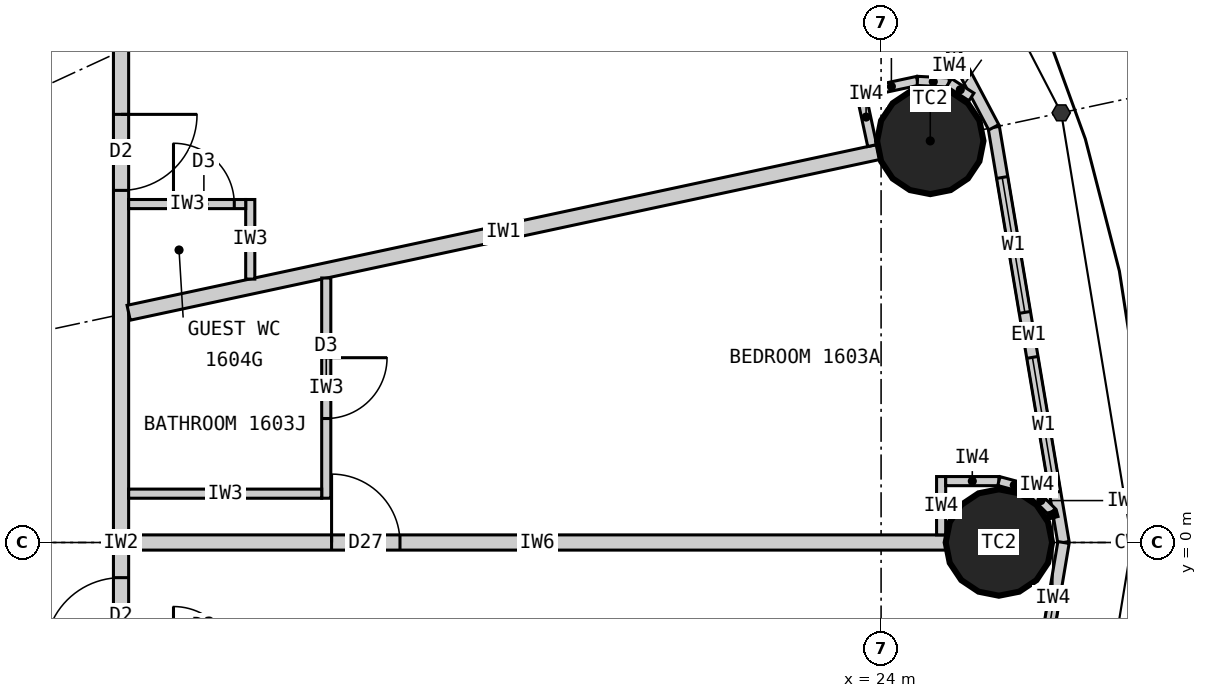
"""IFC4 building model, lengths in metres.
Left out: names, types, materials, properties, quantities, classifications, styles, units other than length and angle.
Written with IfcOpenShell. Run it as: python <this file> out.ifc"""

import sys

from ifc_helpers import new_model, si_unit, direction, frame, frame_2d, origin, origin_2d, place, context, subcontext, project, spatial, rectangle, circle, extrude, element, fill, save


model = new_model("IFC4")
c1 = context("Model", 3, precision=1e-05, world=origin(), true_north=direction((0.0, 1.0)))
c2 = subcontext(c1, "Body", "Model", "MODEL_VIEW")
j1 = project(units=[si_unit("LENGTHUNIT", "METRE"), si_unit("PLANEANGLEUNIT", "RADIAN")], contexts=[c1])
p1 = place(None, origin())
s1 = spatial("IfcSite", under=j1, at=p1, CompositionType="ELEMENT")
p2 = place(p1, origin())
s2 = spatial("IfcBuilding", under=s1, at=p2, CompositionType="ELEMENT")
p3 = place(p2, frame((0.0, 0.0, 67.2)))
s3 = spatial("IfcBuildingStorey", under=s2, at=p3, CompositionType="ELEMENT", Elevation=67.2)
for number, where, z_axis, x_axis in (
    (1, (25.55, 0.0, 0.0), (0.0, 0.0, 1.0), (1.0, 0.0, 0.0)),
    (2, (24.647, 5.283, 0.0), (0.0, 0.0, 1.0), (1.0, 0.0, 0.0)),
):
    element("IfcColumn", number, at=place(p3, frame(where, z_axis=z_axis, x_axis=x_axis)), inside=s3, PredefinedType="COLUMN", context=c2, shape_type="SweptSolid", body=[
        extrude(circle(Radius=0.7, at=origin_2d()), origin(), (0.0, 0.0, 1.0), 3.3),
    ])
p4 = place(p3, frame((26.4, 0.0, 0.0), z_axis=(0.0, 0.0, 1.0), x_axis=(-0.165642551694, 0.986185857264, 0.0)))
e3 = element("IfcWall", 3, at=p4, inside=s3, PredefinedType="ELEMENTEDWALL", context=c2, shape_type="SweptSolid", body=[
    extrude(rectangle(XDim=5.539, YDim=0.15, at=frame_2d((2.77, 0.0))), origin(), (0.0, 0.0, 1.0), 3.12),
])
p5 = place(p4, frame((0.669, 0.0, 0.9)))
e4 = element("IfcOpeningElement", 4, at=p5, cuts=e3, PredefinedType="OPENING", context=c2, shape_type="SweptSolid", body=[
    extrude(rectangle(XDim=1.8, YDim=1.9, at=frame_2d((0.9, 0.95))), frame((0.0, 0.085, 0.0), z_axis=(0.0, -1.0, 0.0), x_axis=(1.0, 0.0, 0.0)), (0.0, 0.0, 1.0), 0.17),
])
p6 = place(p4, frame((3.07, 0.0, 0.9)))
e5 = element("IfcOpeningElement", 5, at=p6, cuts=e3, PredefinedType="OPENING", context=c2, shape_type="SweptSolid", body=[
    extrude(rectangle(XDim=1.8, YDim=1.9, at=frame_2d((0.9, 0.95))), frame((0.0, 0.085, 0.0), z_axis=(0.0, -1.0, 0.0), x_axis=(1.0, 0.0, 0.0)), (0.0, 0.0, 1.0), 0.17),
])
p7 = place(p3, frame((25.482, 5.462, 0.0), z_axis=(0.0, 0.0, 1.0), x_axis=(-0.467296867008, 0.884100468321, 0.0)))
e6 = element("IfcWall", 6, at=p7, inside=s3, PredefinedType="ELEMENTEDWALL", context=c2, shape_type="SweptSolid", body=[
    extrude(rectangle(XDim=5.734, YDim=0.15, at=frame_2d((2.867, 0.0))), origin(), (0.0, 0.0, 1.0), 3.12),
])
p8 = place(p7, frame((0.767, 0.0, 0.9)))
e7 = element("IfcOpeningElement", 7, at=p8, cuts=e6, PredefinedType="OPENING", context=c2, shape_type="SweptSolid", body=[
    extrude(rectangle(XDim=1.8, YDim=1.9, at=frame_2d((0.9, 0.95))), frame((0.0, 0.085, 0.0), z_axis=(0.0, -1.0, 0.0), x_axis=(1.0, 0.0, 0.0)), (0.0, 0.0, 1.0), 0.17),
])
p9 = place(p7, frame((3.167, 0.0, 0.9)))
e8 = element("IfcOpeningElement", 8, at=p9, cuts=e6, PredefinedType="OPENING", context=c2, shape_type="SweptSolid", body=[
    extrude(rectangle(XDim=1.8, YDim=1.9, at=frame_2d((0.9, 0.95))), frame((0.0, 0.085, 0.0), z_axis=(0.0, -1.0, 0.0), x_axis=(1.0, 0.0, 0.0)), (0.0, 0.0, 1.0), 0.17),
])
p10 = place(p3, frame((25.482, -5.462, 0.0), z_axis=(0.0, 0.0, 1.0), x_axis=(0.165642551694, 0.986185857264, 0.0)))
e9 = element("IfcWall", 9, at=p10, inside=s3, PredefinedType="ELEMENTEDWALL", context=c2, shape_type="SweptSolid", body=[
    extrude(rectangle(XDim=5.539, YDim=0.15, at=frame_2d((2.77, 0.0))), origin(), (0.0, 0.0, 1.0), 3.12),
])
p11 = place(p10, frame((0.669, 0.0, 0.9)))
e10 = element("IfcOpeningElement", 10, at=p11, cuts=e9, PredefinedType="OPENING", context=c2, shape_type="SweptSolid", body=[
    extrude(rectangle(XDim=1.8, YDim=1.9, at=frame_2d((0.9, 0.95))), frame((0.0, 0.085, 0.0), z_axis=(0.0, -1.0, 0.0), x_axis=(1.0, 0.0, 0.0)), (0.0, 0.0, 1.0), 0.17),
])
p12 = place(p10, frame((3.07, 0.0, 0.9)))
e11 = element("IfcOpeningElement", 11, at=p12, cuts=e9, PredefinedType="OPENING", context=c2, shape_type="SweptSolid", body=[
    extrude(rectangle(XDim=1.8, YDim=1.9, at=frame_2d((0.9, 0.95))), frame((0.0, 0.085, 0.0), z_axis=(0.0, -1.0, 0.0), x_axis=(1.0, 0.0, 0.0)), (0.0, 0.0, 1.0), 0.17),
])
p13 = place(p3, frame((14.0, -9.9, 0.0), z_axis=(0.0, 0.0, 1.0), x_axis=(0.0, 1.0, 0.0)))
e12 = element("IfcWall", 12, at=p13, inside=s3, PredefinedType="PARTITIONING", context=c2, shape_type="SweptSolid", body=[
    extrude(rectangle(XDim=19.8, YDim=0.2, at=frame_2d((9.9, 0.0))), origin(), (0.0, 0.0, 1.0), 3.12),
])
p14 = place(p13, frame((0.103, 0.0, 0.0)))
e13 = element("IfcOpeningElement", 13, at=p14, cuts=e12, PredefinedType="OPENING", context=c2, shape_type="SweptSolid", body=[
    extrude(rectangle(XDim=1.0, YDim=2.2, at=frame_2d((0.5, 1.1))), frame((0.0, 0.11, 0.0), z_axis=(0.0, -1.0, 0.0), x_axis=(1.0, 0.0, 0.0)), (0.0, 0.0, 1.0), 0.22),
])
p15 = place(p13, frame((5.248, 0.0, 0.0)))
e14 = element("IfcOpeningElement", 14, at=p15, cuts=e12, PredefinedType="OPENING", context=c2, shape_type="SweptSolid", body=[
    extrude(rectangle(XDim=1.0, YDim=2.2, at=frame_2d((0.5, 1.1))), frame((0.0, 0.11, 0.0), z_axis=(0.0, -1.0, 0.0), x_axis=(1.0, 0.0, 0.0)), (0.0, 0.0, 1.0), 0.22),
])
p16 = place(p13, frame((8.438, 0.0, 0.0)))
e15 = element("IfcOpeningElement", 15, at=p16, cuts=e12, PredefinedType="OPENING", context=c2, shape_type="SweptSolid", body=[
    extrude(rectangle(XDim=1.0, YDim=2.2, at=frame_2d((0.5, 1.1))), frame((0.0, 0.11, 0.0), z_axis=(0.0, -1.0, 0.0), x_axis=(1.0, 0.0, 0.0)), (0.0, 0.0, 1.0), 0.22),
])
p17 = place(p13, frame((14.532, 0.0, 0.0)))
e16 = element("IfcOpeningElement", 16, at=p17, cuts=e12, PredefinedType="OPENING", context=c2, shape_type="SweptSolid", body=[
    extrude(rectangle(XDim=1.0, YDim=2.2, at=frame_2d((0.5, 1.1))), frame((0.0, 0.11, 0.0), z_axis=(0.0, -1.0, 0.0), x_axis=(1.0, 0.0, 0.0)), (0.0, 0.0, 1.0), 0.22),
])
p18 = place(p3, frame((14.1, 0.0, 0.0), z_axis=(0.0, 0.0, 1.0), x_axis=(1.0, 0.0, 0.0)))
e17 = element("IfcWall", 17, at=p18, inside=s3, PredefinedType="PARTITIONING", context=c2, shape_type="SweptSolid", body=[
    extrude(rectangle(XDim=10.75, YDim=0.2, at=frame_2d((5.375, 0.0))), origin(), (0.0, 0.0, 1.0), 2.27),
])
p19 = place(p18, frame((2.67, 0.0, 0.0)))
e18 = element("IfcOpeningElement", 18, at=p19, cuts=e17, PredefinedType="OPENING", context=c2, shape_type="SweptSolid", body=[
    extrude(rectangle(XDim=0.9, YDim=2.1, at=frame_2d((0.45, 1.05))), frame((0.0, 0.11, 0.0), z_axis=(0.0, -1.0, 0.0), x_axis=(1.0, 0.0, 0.0)), (0.0, 0.0, 1.0), 0.22),
])
p20 = place(p3, frame((14.1, 3.022, 0.0), z_axis=(0.0, 0.0, 1.0), x_axis=(0.977790014929, 0.209586943072, 0.0)))
e19 = element("IfcWall", 19, at=p20, inside=s3, PredefinedType="PARTITIONING", context=c2, shape_type="SweptSolid", body=[
    extrude(rectangle(XDim=10.087, YDim=0.2, at=frame_2d((5.043, 0.0))), origin(), (0.0, 0.0, 1.0), 2.32),
])
p21 = place(p3, frame((16.7, 3.48, 0.0), z_axis=(0.0, 0.0, 1.0), x_axis=(0.0, -1.0, 0.0)))
e20 = element("IfcWall", 20, at=p21, inside=s3, PredefinedType="PARTITIONING", context=c2, shape_type="SweptSolid", body=[
    extrude(rectangle(XDim=2.897, YDim=0.12, at=frame_2d((1.449, 0.0))), origin(), (0.0, 0.0, 1.0), 3.12),
])
p22 = place(p21, frame((1.049, 0.0, 0.0)))
e21 = element("IfcOpeningElement", 21, at=p22, cuts=e20, PredefinedType="OPENING", context=c2, shape_type="SweptSolid", body=[
    extrude(rectangle(XDim=0.8, YDim=2.1, at=frame_2d((0.4, 1.05))), frame((0.0, 0.07, 0.0), z_axis=(0.0, -1.0, 0.0), x_axis=(1.0, 0.0, 0.0)), (0.0, 0.0, 1.0), 0.14),
])
p23 = place(p3, frame((14.1, 0.643, 0.0), z_axis=(0.0, 0.0, 1.0), x_axis=(1.0, 0.0, 0.0)))
e22 = element("IfcWall", 22, at=p23, inside=s3, PredefinedType="PARTITIONING", context=c2, shape_type="SweptSolid", body=[
    extrude(rectangle(XDim=2.54, YDim=0.12, at=frame_2d((1.27, 0.0))), origin(), (0.0, 0.0, 1.0), 3.12),
])
p24 = place(p3, frame((15.7, 3.465, 0.0), z_axis=(0.0, 0.0, 1.0), x_axis=(0.0, 1.0, 0.0)))
e23 = element("IfcWall", 23, at=p24, inside=s3, PredefinedType="PARTITIONING", context=c2, shape_type="SweptSolid", body=[
    extrude(rectangle(XDim=1.047, YDim=0.12, at=frame_2d((0.523, 0.0))), origin(), (0.0, 0.0, 1.0), 3.12),
])
p25 = place(p3, frame((14.1, 4.452, 0.0), z_axis=(0.0, 0.0, 1.0), x_axis=(1.0, 0.0, 0.0)))
e24 = element("IfcWall", 24, at=p25, inside=s3, PredefinedType="PARTITIONING", context=c2, shape_type="SweptSolid", body=[
    extrude(rectangle(XDim=1.54, YDim=0.12, at=frame_2d((0.77, 0.0))), origin(), (0.0, 0.0, 1.0), 3.12),
])
p26 = place(p25, frame((0.59, 0.0, 0.0)))
e25 = element("IfcOpeningElement", 25, at=p26, cuts=e24, PredefinedType="OPENING", context=c2, shape_type="SweptSolid", body=[
    extrude(rectangle(XDim=0.8, YDim=2.1, at=frame_2d((0.4, 1.05))), frame((0.0, 0.07, 0.0), z_axis=(0.0, -1.0, 0.0), x_axis=(1.0, 0.0, 0.0)), (0.0, 0.0, 1.0), 0.14),
])
p27 = place(p3, frame((24.79, 0.1, 0.0), z_axis=(0.0, 0.0, 1.0), x_axis=(0.0, 1.0, 0.0)))
e26 = element("IfcWall", 26, at=p27, inside=s3, PredefinedType="PARTITIONING", context=c2, shape_type="SweptSolid", body=[
    extrude(rectangle(XDim=0.767, YDim=0.12, at=frame_2d((0.384, 0.0))), origin(), (0.0, 0.0, 1.0), 3.12),
])
p28 = place(p3, frame((24.85, 0.808, 0.0), z_axis=(0.0, 0.0, 1.0), x_axis=(1.0, 0.0, 0.0)))
e27 = element("IfcWall", 27, at=p28, inside=s3, PredefinedType="PARTITIONING", context=c2, shape_type="SweptSolid", body=[
    extrude(rectangle(XDim=0.7, YDim=0.12, at=frame_2d((0.35, 0.0))), origin(), (0.0, 0.0, 1.0), 3.12),
])
p29 = place(p3, frame((25.55, 0.808, 0.0), z_axis=(0.0, 0.0, 1.0), x_axis=(0.965807183573, -0.2592614205, 0.0)))
e28 = element("IfcWall", 28, at=p29, inside=s3, PredefinedType="PARTITIONING", context=c2, shape_type="SweptSolid", body=[
    extrude(rectangle(XDim=0.418, YDim=0.12, at=frame_2d((0.209, 0.0))), origin(), (0.0, 0.0, 1.0), 3.12),
])
p30 = place(p3, frame((25.954, 0.699, 0.0), z_axis=(0.0, 0.0, 1.0), x_axis=(0.707106781187, -0.707106781187, 0.0)))
e29 = element("IfcWall", 29, at=p30, inside=s3, PredefinedType="PARTITIONING", context=c2, shape_type="SweptSolid", body=[
    extrude(rectangle(XDim=0.418, YDim=0.12, at=frame_2d((0.209, 0.0))), origin(), (0.0, 0.0, 1.0), 3.12),
])
p31 = place(p3, frame((26.249, 0.404, 0.0), z_axis=(0.0, 0.0, 1.0), x_axis=(0.259754282609, -0.965674744759, 0.0)))
e30 = element("IfcWall", 30, at=p31, inside=s3, PredefinedType="PARTITIONING", context=c2, shape_type="SweptSolid", body=[
    extrude(rectangle(XDim=0.08, YDim=0.12, at=frame_2d((0.04, 0.0))), origin(), (0.0, 0.0, 1.0), 3.12),
])
p32 = place(p3, frame((23.883, 5.222, 0.0), z_axis=(0.0, 0.0, 1.0), x_axis=(-0.209311842415, 0.977848941619, 0.0)))
e31 = element("IfcWall", 31, at=p32, inside=s3, PredefinedType="PARTITIONING", context=c2, shape_type="SweptSolid", body=[
    extrude(rectangle(XDim=0.768, YDim=0.12, at=frame_2d((0.384, 0.0))), origin(), (0.0, 0.0, 1.0), 3.12),
])
p33 = place(p3, frame((23.793, 5.926, 0.0), z_axis=(0.0, 0.0, 1.0), x_axis=(0.977792206673, 0.209576717621, 0.0)))
e32 = element("IfcWall", 32, at=p33, inside=s3, PredefinedType="PARTITIONING", context=c2, shape_type="SweptSolid", body=[
    extrude(rectangle(XDim=0.7, YDim=0.12, at=frame_2d((0.35, 0.0))), origin(), (0.0, 0.0, 1.0), 3.12),
])
p34 = place(p3, frame((24.478, 6.073, 0.0), z_axis=(0.0, 0.0, 1.0), x_axis=(0.998708262812, -0.05081147302, 0.0)))
e33 = element("IfcWall", 33, at=p34, inside=s3, PredefinedType="PARTITIONING", context=c2, shape_type="SweptSolid", body=[
    extrude(rectangle(XDim=0.418, YDim=0.12, at=frame_2d((0.209, 0.0))), origin(), (0.0, 0.0, 1.0), 3.12),
])
p35 = place(p3, frame((24.895, 6.052, 0.0), z_axis=(0.0, 0.0, 1.0), x_axis=(0.839495197275, -0.54336710772, 0.0)))
e34 = element("IfcWall", 34, at=p35, inside=s3, PredefinedType="PARTITIONING", context=c2, shape_type="SweptSolid", body=[
    extrude(rectangle(XDim=0.35, YDim=0.12, at=frame_2d((0.175, 0.0))), origin(), (0.0, 0.0, 1.0), 3.12),
])
p36 = place(p5, origin())
e35 = element("IfcWindow", 35, at=p36, inside=s3, PartitioningType="SINGLE_PANEL", PredefinedType="WINDOW", context=c2, shape_type="SweptSolid", body=[
    extrude(rectangle(XDim=1.8, YDim=1.9, at=frame_2d((0.9, 0.95))), frame((0.0, 0.03, 0.0), z_axis=(0.0, -1.0, 0.0), x_axis=(1.0, 0.0, 0.0)), (0.0, 0.0, 1.0), 0.06),
])
fill(e4, e35)
p37 = place(p6, origin())
e36 = element("IfcWindow", 36, at=p37, inside=s3, PartitioningType="SINGLE_PANEL", PredefinedType="WINDOW", context=c2, shape_type="SweptSolid", body=[
    extrude(rectangle(XDim=1.8, YDim=1.9, at=frame_2d((0.9, 0.95))), frame((0.0, 0.03, 0.0), z_axis=(0.0, -1.0, 0.0), x_axis=(1.0, 0.0, 0.0)), (0.0, 0.0, 1.0), 0.06),
])
fill(e5, e36)
p38 = place(p8, origin())
e37 = element("IfcWindow", 37, at=p38, inside=s3, PartitioningType="SINGLE_PANEL", PredefinedType="WINDOW", context=c2, shape_type="SweptSolid", body=[
    extrude(rectangle(XDim=1.8, YDim=1.9, at=frame_2d((0.9, 0.95))), frame((0.0, 0.03, 0.0), z_axis=(0.0, -1.0, 0.0), x_axis=(1.0, 0.0, 0.0)), (0.0, 0.0, 1.0), 0.06),
])
fill(e7, e37)
p39 = place(p12, origin())
e38 = element("IfcWindow", 38, at=p39, inside=s3, PartitioningType="SINGLE_PANEL", PredefinedType="WINDOW", context=c2, shape_type="SweptSolid", body=[
    extrude(rectangle(XDim=1.8, YDim=1.9, at=frame_2d((0.9, 0.95))), frame((0.0, 0.03, 0.0), z_axis=(0.0, -1.0, 0.0), x_axis=(1.0, 0.0, 0.0)), (0.0, 0.0, 1.0), 0.06),
])
fill(e11, e38)
p40 = place(p16, origin())
e39 = element("IfcDoor", 39, at=p40, inside=s3, OperationType="SINGLE_SWING_LEFT", PredefinedType="DOOR", context=c2, shape_type="SweptSolid", body=[
    extrude(rectangle(XDim=1.0, YDim=2.2, at=frame_2d((0.5, 1.1))), frame((0.0, 0.025, 0.0), z_axis=(0.0, -1.0, 0.0), x_axis=(1.0, 0.0, 0.0)), (0.0, 0.0, 1.0), 0.05),
])
fill(e15, e39)
p41 = place(p22, origin())
e40 = element("IfcDoor", 40, at=p41, inside=s3, OperationType="SINGLE_SWING_LEFT", PredefinedType="DOOR", context=c2, shape_type="SweptSolid", body=[
    extrude(rectangle(XDim=0.8, YDim=2.1, at=frame_2d((0.4, 1.05))), frame((0.0, 0.025, 0.0), z_axis=(0.0, -1.0, 0.0), x_axis=(1.0, 0.0, 0.0)), (0.0, 0.0, 1.0), 0.05),
])
fill(e21, e40)
p42 = place(p19, origin())
e41 = element("IfcDoor", 41, at=p42, inside=s3, OperationType="SINGLE_SWING_LEFT", PredefinedType="DOOR", context=c2, shape_type="SweptSolid", body=[
    extrude(rectangle(XDim=0.9, YDim=2.1, at=frame_2d((0.45, 1.05))), frame((0.0, 0.025, 0.0), z_axis=(0.0, -1.0, 0.0), x_axis=(1.0, 0.0, 0.0)), (0.0, 0.0, 1.0), 0.05),
])
fill(e18, e41)
p43 = place(p26, origin())
e42 = element("IfcDoor", 42, at=p43, inside=s3, OperationType="SINGLE_SWING_LEFT", PredefinedType="DOOR", context=c2, shape_type="SweptSolid", body=[
    extrude(rectangle(XDim=0.8, YDim=2.1, at=frame_2d((0.4, 1.05))), frame((0.0, 0.025, 0.0), z_axis=(0.0, -1.0, 0.0), x_axis=(1.0, 0.0, 0.0)), (0.0, 0.0, 1.0), 0.05),
])
fill(e25, e42)
p44 = place(p17, origin())
e43 = element("IfcDoor", 43, at=p44, inside=s3, OperationType="SINGLE_SWING_RIGHT", PredefinedType="DOOR", context=c2, shape_type="SweptSolid", body=[
    extrude(rectangle(XDim=1.0, YDim=2.2, at=frame_2d((0.5, 1.1))), frame((0.0, 0.025, 0.0), z_axis=(0.0, -1.0, 0.0), x_axis=(1.0, 0.0, 0.0)), (0.0, 0.0, 1.0), 0.05),
])
fill(e16, e43)
save(model, sys.argv[1])
